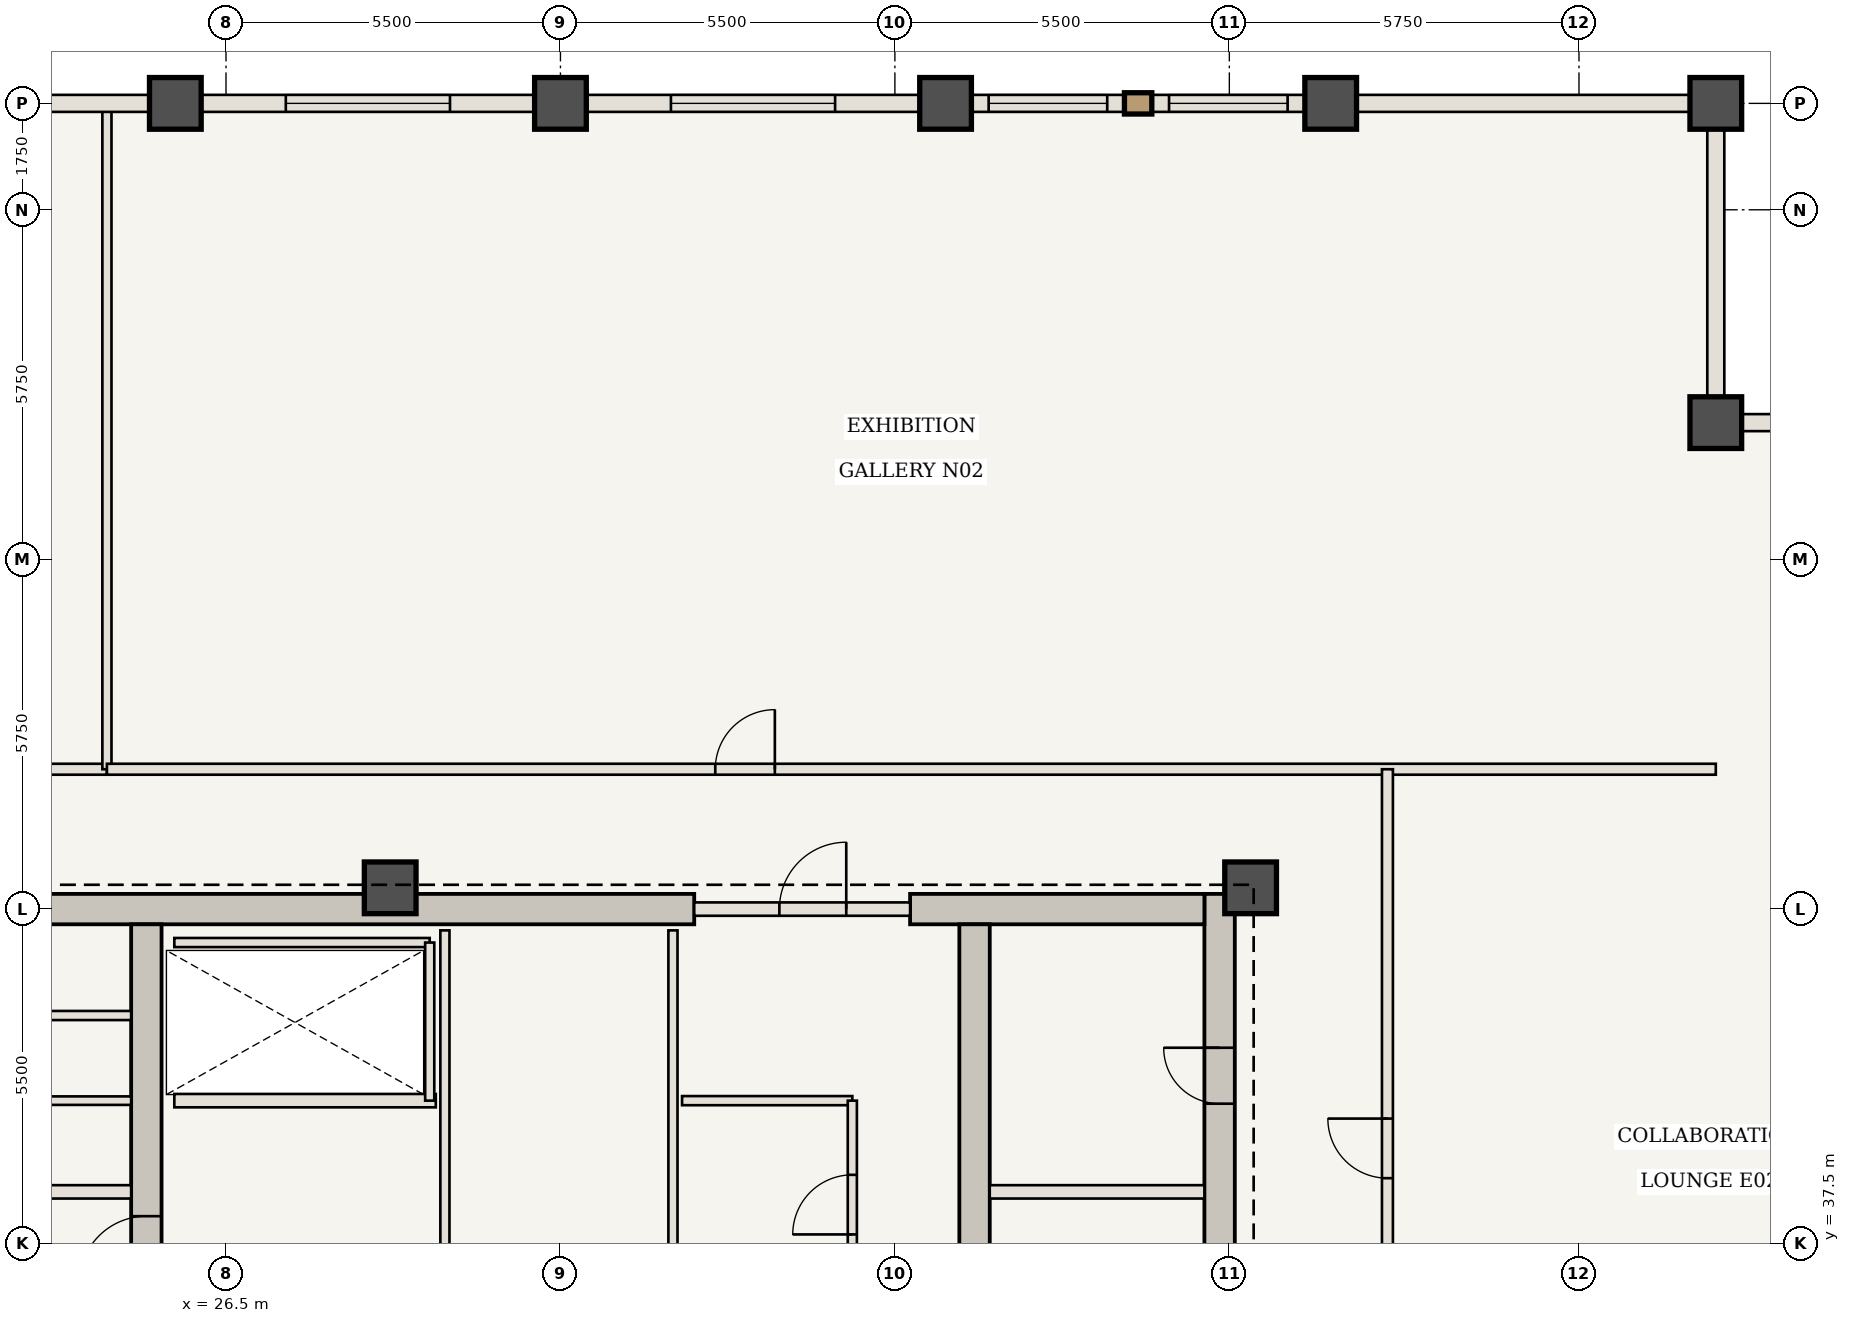
"""IFC4 building model, lengths in metres.
Left out: names, types, materials, properties, quantities, classifications, styles, units other than length and angle.
Written with IfcOpenShell. Run it as: python <this file> out.ifc"""

import sys

from ifc_helpers import new_model, si_unit, direction, frame, frame_2d, origin, origin_2d, place, context, subcontext, project, spatial, rectangle, extrude, element, fill, save


model = new_model("IFC4")
c1 = context("Model", 3, precision=1e-05, world=origin(), true_north=direction((0.0, 1.0)))
c2 = subcontext(c1, "Body", "Model", "MODEL_VIEW")
j1 = project(units=[si_unit("LENGTHUNIT", "METRE"), si_unit("PLANEANGLEUNIT", "RADIAN")], contexts=[c1])
p1 = place(None, origin())
s1 = spatial("IfcSite", under=j1, at=p1, CompositionType="ELEMENT")
p2 = place(p1, origin())
s2 = spatial("IfcBuilding", under=s1, at=p2, CompositionType="ELEMENT")
p3 = place(p2, frame((0.0, 0.0, 217.7)))
s3 = spatial("IfcBuildingStorey", under=s2, at=p3, CompositionType="ELEMENT", Elevation=217.7)
p4 = place(p3, frame((42.84, 30.6, 0.0), z_axis=(0.0, 0.0, 1.0), x_axis=(0.0, 1.0, 0.0)))
e1 = element("IfcWall", 1, at=p4, inside=s3, PredefinedType="SHEAR", context=c2, shape_type="SweptSolid", body=[
    extrude(rectangle(XDim=12.65, YDim=0.5, at=frame_2d((6.325, 0.0))), origin(), (0.0, 0.0, 1.0), 3.85),
])
p5 = place(p4, frame((4.2, 0.0, 0.0)))
e2 = element("IfcOpeningElement", 2, at=p5, cuts=e1, PredefinedType="OPENING", context=c2, shape_type="SweptSolid", body=[
    extrude(rectangle(XDim=1.1, YDim=2.15, at=frame_2d((0.55, 1.075))), frame((0.0, 0.26, 0.0), z_axis=(0.0, -1.0, 0.0), x_axis=(1.0, 0.0, 0.0)), (0.0, 0.0, 1.0), 0.52),
])
p6 = place(p4, frame((9.2, 0.0, 0.0)))
e3 = element("IfcOpeningElement", 3, at=p6, cuts=e1, PredefinedType="OPENING", context=c2, shape_type="SweptSolid", body=[
    extrude(rectangle(XDim=0.92, YDim=2.1, at=frame_2d((0.46, 1.05))), frame((0.0, 0.26, 0.0), z_axis=(0.0, -1.0, 0.0), x_axis=(1.0, 0.0, 0.0)), (0.0, 0.0, 1.0), 0.52),
])
p7 = place(p3, frame((21.41, 43.0, 0.0), z_axis=(0.0, 0.0, 1.0), x_axis=(1.0, 0.0, 0.0)))
e4 = element("IfcWall", 4, at=p7, inside=s3, PredefinedType="SHEAR", context=c2, shape_type="SweptSolid", body=[
    extrude(rectangle(XDim=12.79, YDim=0.5, at=frame_2d((6.395, 0.0))), origin(), (0.0, 0.0, 1.0), 3.85),
])
p8 = place(p3, frame((37.75, 43.0, 0.0), z_axis=(0.0, 0.0, 1.0), x_axis=(1.0, 0.0, 0.0)))
e5 = element("IfcWall", 5, at=p8, inside=s3, PredefinedType="SHEAR", context=c2, shape_type="SweptSolid", body=[
    extrude(rectangle(XDim=4.84, YDim=0.5, at=frame_2d((2.42, 0.0))), origin(), (0.0, 0.0, 1.0), 3.85),
])
p9 = place(p3, frame((25.19, 30.6, 0.0), z_axis=(0.0, 0.0, 1.0), x_axis=(0.0, 1.0, 0.0)))
e6 = element("IfcWall", 6, at=p9, inside=s3, PredefinedType="SHEAR", context=c2, shape_type="SweptSolid", body=[
    extrude(rectangle(XDim=12.15, YDim=0.5, at=frame_2d((6.075, 0.0))), origin(), (0.0, 0.0, 1.0), 3.85),
])
p10 = place(p9, frame((6.25, 0.0, 0.0)))
e7 = element("IfcOpeningElement", 7, at=p10, cuts=e6, PredefinedType="OPENING", context=c2, shape_type="SweptSolid", body=[
    extrude(rectangle(XDim=1.1, YDim=2.15, at=frame_2d((0.55, 1.075))), frame((0.0, 0.26, 0.0), z_axis=(0.0, -1.0, 0.0), x_axis=(1.0, 0.0, 0.0)), (0.0, 0.0, 1.0), 0.52),
])
p11 = place(p3, frame((38.81, 30.6, 0.0), z_axis=(0.0, 0.0, 1.0), x_axis=(0.0, 1.0, 0.0)))
e8 = element("IfcWall", 8, at=p11, inside=s3, PredefinedType="SHEAR", context=c2, shape_type="SweptSolid", body=[
    extrude(rectangle(XDim=12.15, YDim=0.5, at=frame_2d((6.075, 0.0))), origin(), (0.0, 0.0, 1.0), 3.85),
])
for number, where, z_axis, x_axis in (
    (9, (43.35, 43.35, 0.0), (0.0, 0.0, 1.0), (1.0, 0.0, 0.0)),
    (10, (29.2, 43.35, 0.0), (0.0, 0.0, 1.0), (1.0, 0.0, 0.0)),
    (11, (51.0, 51.0, 0.0), (0.0, 0.0, 1.0), (1.0, 0.0, 0.0)),
    (12, (51.0, 56.25, 0.0), (0.0, 0.0, 1.0), (1.0, 0.0, 0.0)),
    (13, (25.667, 56.25, 0.0), (0.0, 0.0, 1.0), (1.0, 0.0, 0.0)),
    (14, (32.0, 56.25, 0.0), (0.0, 0.0, 1.0), (1.0, 0.0, 0.0)),
    (15, (38.333, 56.25, 0.0), (0.0, 0.0, 1.0), (1.0, 0.0, 0.0)),
    (16, (44.667, 56.25, 0.0), (0.0, 0.0, 1.0), (1.0, 0.0, 0.0)),
):
    element("IfcColumn", number, at=place(p3, frame(where, z_axis=z_axis, x_axis=x_axis)), inside=s3, PredefinedType="COLUMN", context=c2, shape_type="SweptSolid", body=[
        extrude(rectangle(XDim=0.85, YDim=0.85, at=origin_2d()), origin(), (0.0, 0.0, 1.0), 3.85),
    ])
for number, where, z_axis, x_axis in (
    (17, (21.41, 38.35, 0.0), (0.0, 0.0, 1.0), (1.0, 0.0, 0.0)),
    (18, (39.06, 38.35, 0.0), (0.0, 0.0, 1.0), (1.0, 0.0, 0.0)),
):
    element("IfcWall", number, at=place(p3, frame(where, z_axis=z_axis, x_axis=x_axis)), inside=s3, PredefinedType="STANDARD", context=c2, shape_type="SweptSolid", body=[
        extrude(rectangle(XDim=3.53, YDim=0.22, at=frame_2d((1.765, 0.0))), origin(), (0.0, 0.0, 1.0), 3.685),
    ])
p12 = place(p3, frame((21.41, 39.85, 0.0), z_axis=(0.0, 0.0, 1.0), x_axis=(1.0, 0.0, 0.0)))
e19 = element("IfcWall", 19, at=p12, inside=s3, PredefinedType="STANDARD", context=c2, shape_type="SweptSolid", body=[
    extrude(rectangle(XDim=3.53, YDim=0.14, at=frame_2d((1.765, 0.0))), origin(), (0.0, 0.0, 1.0), 3.685),
])
p13 = place(p3, frame((21.41, 41.25, 0.0), z_axis=(0.0, 0.0, 1.0), x_axis=(1.0, 0.0, 0.0)))
e20 = element("IfcWall", 20, at=p13, inside=s3, PredefinedType="STANDARD", context=c2, shape_type="SweptSolid", body=[
    extrude(rectangle(XDim=3.53, YDim=0.15, at=frame_2d((1.765, 0.0))), origin(), (0.0, 0.0, 1.0), 3.685),
])
p14 = place(p3, frame((34.0, 39.85, 0.0), z_axis=(0.0, 0.0, 1.0), x_axis=(1.0, 0.0, 0.0)))
e21 = element("IfcWall", 21, at=p14, inside=s3, PredefinedType="STANDARD", context=c2, shape_type="SweptSolid", body=[
    extrude(rectangle(XDim=2.8, YDim=0.15, at=frame_2d((1.4, 0.0))), origin(), (0.0, 0.0, 1.0), 3.685),
])
p15 = place(p3, frame((36.8, 36.95, 0.0), z_axis=(0.0, 0.0, 1.0), x_axis=(0.0, 1.0, 0.0)))
e22 = element("IfcWall", 22, at=p15, inside=s3, PredefinedType="STANDARD", context=c2, shape_type="SweptSolid", body=[
    extrude(rectangle(XDim=2.9, YDim=0.15, at=frame_2d((1.45, 0.0))), origin(), (0.0, 0.0, 1.0), 3.685),
])
p16 = place(p15, frame((0.7, 0.0, 0.0)))
e23 = element("IfcOpeningElement", 23, at=p16, cuts=e22, PredefinedType="OPENING", context=c2, shape_type="SweptSolid", body=[
    extrude(rectangle(XDim=0.98, YDim=2.2, at=frame_2d((0.49, 1.1))), frame((0.0, 0.085, 0.0), z_axis=(0.0, -1.0, 0.0), x_axis=(1.0, 0.0, 0.0)), (0.0, 0.0, 1.0), 0.17),
])
p17 = place(p3, frame((25.65, 39.85, 0.0), z_axis=(0.0, 0.0, 1.0), x_axis=(1.0, 0.0, 0.0)))
e24 = element("IfcWall", 24, at=p17, inside=s3, PredefinedType="STANDARD", context=c2, shape_type="SweptSolid", body=[
    extrude(rectangle(XDim=4.3, YDim=0.22, at=frame_2d((2.15, 0.0))), origin(), (0.0, 0.0, 1.0), 3.685),
])
p18 = place(p3, frame((25.65, 42.45, 0.0), z_axis=(0.0, 0.0, 1.0), x_axis=(1.0, 0.0, 0.0)))
e25 = element("IfcWall", 25, at=p18, inside=s3, PredefinedType="STANDARD", context=c2, shape_type="SweptSolid", body=[
    extrude(rectangle(XDim=4.2, YDim=0.15, at=frame_2d((2.1, 0.0))), origin(), (0.0, 0.0, 1.0), 3.685),
])
p19 = place(p3, frame((29.85, 39.85, 0.0), z_axis=(0.0, 0.0, 1.0), x_axis=(0.0, 1.0, 0.0)))
e26 = element("IfcWall", 26, at=p19, inside=s3, PredefinedType="STANDARD", context=c2, shape_type="SweptSolid", body=[
    extrude(rectangle(XDim=2.6, YDim=0.15, at=frame_2d((1.3, 0.0))), origin(), (0.0, 0.0, 1.0), 3.685),
])
for number, where, z_axis, x_axis in (
    (27, (30.1, 33.45, 0.0), (0.0, 0.0, 1.0), (0.0, 1.0, 0.0)),
    (28, (33.85, 33.45, 0.0), (0.0, 0.0, 1.0), (0.0, 1.0, 0.0)),
):
    element("IfcWall", number, at=place(p3, frame(where, z_axis=z_axis, x_axis=x_axis)), inside=s3, PredefinedType="STANDARD", context=c2, shape_type="SweptSolid", body=[
        extrude(rectangle(XDim=9.2, YDim=0.15, at=frame_2d((4.6, 0.0))), origin(), (0.0, 0.0, 1.0), 3.685),
    ])
p20 = place(p3, frame((34.2, 43.0, 0.0), z_axis=(0.0, 0.0, 1.0), x_axis=(1.0, 0.0, 0.0)))
e29 = element("IfcWall", 29, at=p20, inside=s3, PredefinedType="STANDARD", context=c2, shape_type="SweptSolid", body=[
    extrude(rectangle(XDim=3.55, YDim=0.22, at=frame_2d((1.775, 0.0))), origin(), (0.0, 0.0, 1.0), 3.685),
])
p21 = place(p20, frame((1.4, 0.0, 0.0)))
e30 = element("IfcOpeningElement", 30, at=p21, cuts=e29, PredefinedType="OPENING", context=c2, shape_type="SweptSolid", body=[
    extrude(rectangle(XDim=1.1, YDim=2.15, at=frame_2d((0.55, 1.075))), frame((0.0, 0.12, 0.0), z_axis=(0.0, -1.0, 0.0), x_axis=(1.0, 0.0, 0.0)), (0.0, 0.0, 1.0), 0.24),
])
p22 = place(p3, frame((13.0, 45.3, 0.0), z_axis=(0.0, 0.0, 1.0), x_axis=(1.0, 0.0, 0.0)))
e31 = element("IfcWall", 31, at=p22, inside=s3, PredefinedType="STANDARD", context=c2, shape_type="SweptSolid", body=[
    extrude(rectangle(XDim=11.542, YDim=0.18, at=frame_2d((5.771, 0.0))), origin(), (0.0, 0.0, 1.0), 3.685),
])
p23 = place(p22, frame((6.671, 0.0, 0.0)))
e32 = element("IfcOpeningElement", 32, at=p23, cuts=e31, PredefinedType="OPENING", context=c2, shape_type="SweptSolid", body=[
    extrude(rectangle(XDim=0.98, YDim=2.2, at=frame_2d((0.49, 1.1))), frame((0.0, 0.1, 0.0), z_axis=(0.0, -1.0, 0.0), x_axis=(1.0, 0.0, 0.0)), (0.0, 0.0, 1.0), 0.2),
])
p24 = place(p3, frame((24.542, 45.3, 0.0), z_axis=(0.0, 0.0, 1.0), x_axis=(0.0, 1.0, 0.0)))
e33 = element("IfcWall", 33, at=p24, inside=s3, PredefinedType="STANDARD", context=c2, shape_type="SweptSolid", body=[
    extrude(rectangle(XDim=10.89, YDim=0.15, at=frame_2d((5.445, 0.0))), origin(), (0.0, 0.0, 1.0), 3.685),
])
p25 = place(p3, frame((24.542, 45.3, 0.0), z_axis=(0.0, 0.0, 1.0), x_axis=(1.0, 0.0, 0.0)))
e34 = element("IfcWall", 34, at=p25, inside=s3, PredefinedType="STANDARD", context=c2, shape_type="SweptSolid", body=[
    extrude(rectangle(XDim=26.458, YDim=0.18, at=frame_2d((13.229, 0.0))), origin(), (0.0, 0.0, 1.0), 3.685),
])
p26 = place(p25, frame((10.004, 0.0, 0.0)))
e35 = element("IfcOpeningElement", 35, at=p26, cuts=e34, PredefinedType="OPENING", context=c2, shape_type="SweptSolid", body=[
    extrude(rectangle(XDim=0.98, YDim=2.2, at=frame_2d((0.49, 1.1))), frame((0.0, 0.1, 0.0), z_axis=(0.0, -1.0, 0.0), x_axis=(1.0, 0.0, 0.0)), (0.0, 0.0, 1.0), 0.2),
])
p27 = place(p3, frame((45.6, 32.85, 0.0), z_axis=(0.0, 0.0, 1.0), x_axis=(0.0, 1.0, 0.0)))
e36 = element("IfcWall", 36, at=p27, inside=s3, PredefinedType="STANDARD", context=c2, shape_type="SweptSolid", body=[
    extrude(rectangle(XDim=12.45, YDim=0.18, at=frame_2d((6.225, 0.0))), origin(), (0.0, 0.0, 1.0), 3.685),
])
p28 = place(p27, frame((5.725, 0.0, 0.0)))
e37 = element("IfcOpeningElement", 37, at=p28, cuts=e36, PredefinedType="OPENING", context=c2, shape_type="SweptSolid", body=[
    extrude(rectangle(XDim=0.98, YDim=2.2, at=frame_2d((0.49, 1.1))), frame((0.0, 0.1, 0.0), z_axis=(0.0, -1.0, 0.0), x_axis=(1.0, 0.0, 0.0)), (0.0, 0.0, 1.0), 0.2),
])
p29 = place(p3, frame((19.333, 56.25, 0.0), z_axis=(0.0, 0.0, 1.0), x_axis=(1.0, 0.0, 0.0)))
e38 = element("IfcWall", 38, at=p29, inside=s3, PredefinedType="USERDEFINED", context=c2, shape_type="SweptSolid", body=[
    extrude(rectangle(XDim=6.333, YDim=0.28, at=frame_2d((3.167, 0.0))), origin(), (0.0, 0.0, 1.0), 2.985),
])
p30 = place(p29, frame((0.708, 0.0, 0.85)))
e39 = element("IfcOpeningElement", 39, at=p30, cuts=e38, PredefinedType="OPENING", context=c2, shape_type="SweptSolid", body=[
    extrude(rectangle(XDim=1.95, YDim=1.935, at=frame_2d((0.975, 0.968))), frame((0.0, 0.15, 0.0), z_axis=(0.0, -1.0, 0.0), x_axis=(1.0, 0.0, 0.0)), (0.0, 0.0, 1.0), 0.3),
])
p31 = place(p3, frame((25.667, 56.25, 0.0), z_axis=(0.0, 0.0, 1.0), x_axis=(1.0, 0.0, 0.0)))
e40 = element("IfcWall", 40, at=p31, inside=s3, PredefinedType="USERDEFINED", context=c2, shape_type="SweptSolid", body=[
    extrude(rectangle(XDim=6.333, YDim=0.28, at=frame_2d((3.167, 0.0))), origin(), (0.0, 0.0, 1.0), 2.985),
])
p32 = place(p31, frame((1.817, 0.0, 0.85)))
e41 = element("IfcOpeningElement", 41, at=p32, cuts=e40, PredefinedType="OPENING", context=c2, shape_type="SweptSolid", body=[
    extrude(rectangle(XDim=2.7, YDim=1.935, at=frame_2d((1.35, 0.968))), frame((0.0, 0.15, 0.0), z_axis=(0.0, -1.0, 0.0), x_axis=(1.0, 0.0, 0.0)), (0.0, 0.0, 1.0), 0.3),
])
p33 = place(p3, frame((32.0, 56.25, 0.0), z_axis=(0.0, 0.0, 1.0), x_axis=(1.0, 0.0, 0.0)))
e42 = element("IfcWall", 42, at=p33, inside=s3, PredefinedType="USERDEFINED", context=c2, shape_type="SweptSolid", body=[
    extrude(rectangle(XDim=6.333, YDim=0.28, at=frame_2d((3.167, 0.0))), origin(), (0.0, 0.0, 1.0), 2.985),
])
p34 = place(p33, frame((1.817, 0.0, 0.85)))
e43 = element("IfcOpeningElement", 43, at=p34, cuts=e42, PredefinedType="OPENING", context=c2, shape_type="SweptSolid", body=[
    extrude(rectangle(XDim=2.7, YDim=1.935, at=frame_2d((1.35, 0.968))), frame((0.0, 0.15, 0.0), z_axis=(0.0, -1.0, 0.0), x_axis=(1.0, 0.0, 0.0)), (0.0, 0.0, 1.0), 0.3),
])
p35 = place(p3, frame((38.333, 56.25, 0.0), z_axis=(0.0, 0.0, 1.0), x_axis=(1.0, 0.0, 0.0)))
e44 = element("IfcWall", 44, at=p35, inside=s3, PredefinedType="USERDEFINED", context=c2, shape_type="SweptSolid", body=[
    extrude(rectangle(XDim=6.333, YDim=0.28, at=frame_2d((3.167, 0.0))), origin(), (0.0, 0.0, 1.0), 2.985),
])
p36 = place(p35, frame((0.708, 0.0, 0.85)))
e45 = element("IfcOpeningElement", 45, at=p36, cuts=e44, PredefinedType="OPENING", context=c2, shape_type="SweptSolid", body=[
    extrude(rectangle(XDim=1.95, YDim=1.935, at=frame_2d((0.975, 0.968))), frame((0.0, 0.15, 0.0), z_axis=(0.0, -1.0, 0.0), x_axis=(1.0, 0.0, 0.0)), (0.0, 0.0, 1.0), 0.3),
])
p37 = place(p35, frame((3.675, 0.0, 0.85)))
e46 = element("IfcOpeningElement", 46, at=p37, cuts=e44, PredefinedType="OPENING", context=c2, shape_type="SweptSolid", body=[
    extrude(rectangle(XDim=1.95, YDim=1.935, at=frame_2d((0.975, 0.968))), frame((0.0, 0.15, 0.0), z_axis=(0.0, -1.0, 0.0), x_axis=(1.0, 0.0, 0.0)), (0.0, 0.0, 1.0), 0.3),
])
p38 = place(p3, frame((44.667, 56.25, 0.0), z_axis=(0.0, 0.0, 1.0), x_axis=(1.0, 0.0, 0.0)))
e47 = element("IfcWall", 47, at=p38, inside=s3, PredefinedType="USERDEFINED", context=c2, shape_type="SweptSolid", body=[
    extrude(rectangle(XDim=6.333, YDim=0.28, at=frame_2d((3.167, 0.0))), origin(), (0.0, 0.0, 1.0), 2.985),
])
for number, where, z_axis, x_axis in (
    (48, (51.0, 51.0, 0.0), (0.0, 0.0, 1.0), (1.0, 0.0, 0.0)),
    (49, (51.0, 56.25, 0.0), (0.0, 0.0, 1.0), (0.0, -1.0, 0.0)),
):
    element("IfcWall", number, at=place(p3, frame(where, z_axis=z_axis, x_axis=x_axis)), inside=s3, PredefinedType="USERDEFINED", context=c2, shape_type="SweptSolid", body=[
        extrude(rectangle(XDim=5.25, YDim=0.28, at=frame_2d((2.625, 0.0))), origin(), (0.0, 0.0, 1.0), 2.985),
    ])
p39 = place(p10, origin())
e50 = element("IfcDoor", 50, at=p39, inside=s3, OperationType="SINGLE_SWING_LEFT", PredefinedType="DOOR", context=c2, shape_type="SweptSolid", body=[
    extrude(rectangle(XDim=1.1, YDim=2.15, at=frame_2d((0.55, 1.075))), frame((0.0, 0.025, 0.0), z_axis=(0.0, -1.0, 0.0), x_axis=(1.0, 0.0, 0.0)), (0.0, 0.0, 1.0), 0.05),
])
fill(e7, e50)
p40 = place(p6, origin())
e51 = element("IfcDoor", 51, at=p40, inside=s3, OperationType="SINGLE_SWING_RIGHT", PredefinedType="DOOR", context=c2, shape_type="SweptSolid", body=[
    extrude(rectangle(XDim=0.92, YDim=2.1, at=frame_2d((0.46, 1.05))), frame((0.0, 0.025, 0.0), z_axis=(0.0, -1.0, 0.0), x_axis=(1.0, 0.0, 0.0)), (0.0, 0.0, 1.0), 0.05),
])
fill(e3, e51)
p41 = place(p16, origin())
e52 = element("IfcDoor", 52, at=p41, inside=s3, OperationType="SINGLE_SWING_LEFT", PredefinedType="DOOR", context=c2, shape_type="SweptSolid", body=[
    extrude(rectangle(XDim=0.98, YDim=2.2, at=frame_2d((0.49, 1.1))), frame((0.0, 0.025, 0.0), z_axis=(0.0, -1.0, 0.0), x_axis=(1.0, 0.0, 0.0)), (0.0, 0.0, 1.0), 0.05),
])
fill(e23, e52)
p42 = place(p21, origin())
e53 = element("IfcDoor", 53, at=p42, inside=s3, OperationType="SINGLE_SWING_RIGHT", PredefinedType="DOOR", context=c2, shape_type="SweptSolid", body=[
    extrude(rectangle(XDim=1.1, YDim=2.15, at=frame_2d((0.55, 1.075))), frame((0.0, 0.025, 0.0), z_axis=(0.0, -1.0, 0.0), x_axis=(1.0, 0.0, 0.0)), (0.0, 0.0, 1.0), 0.05),
])
fill(e30, e53)
p43 = place(p26, origin())
e54 = element("IfcDoor", 54, at=p43, inside=s3, OperationType="SINGLE_SWING_RIGHT", PredefinedType="DOOR", context=c2, shape_type="SweptSolid", body=[
    extrude(rectangle(XDim=0.98, YDim=2.2, at=frame_2d((0.49, 1.1))), frame((0.0, 0.025, 0.0), z_axis=(0.0, -1.0, 0.0), x_axis=(1.0, 0.0, 0.0)), (0.0, 0.0, 1.0), 0.05),
])
fill(e35, e54)
p44 = place(p28, origin())
e55 = element("IfcDoor", 55, at=p44, inside=s3, OperationType="SINGLE_SWING_RIGHT", PredefinedType="DOOR", context=c2, shape_type="SweptSolid", body=[
    extrude(rectangle(XDim=0.98, YDim=2.2, at=frame_2d((0.49, 1.1))), frame((0.0, 0.025, 0.0), z_axis=(0.0, -1.0, 0.0), x_axis=(1.0, 0.0, 0.0)), (0.0, 0.0, 1.0), 0.05),
])
fill(e37, e55)
p45 = place(p32, origin())
e56 = element("IfcWindow", 56, at=p45, inside=s3, PartitioningType="SINGLE_PANEL", PredefinedType="WINDOW", context=c2, shape_type="SweptSolid", body=[
    extrude(rectangle(XDim=2.7, YDim=1.935, at=frame_2d((1.35, 0.968))), frame((0.0, 0.03, 0.0), z_axis=(0.0, -1.0, 0.0), x_axis=(1.0, 0.0, 0.0)), (0.0, 0.0, 1.0), 0.06),
])
fill(e41, e56)
p46 = place(p34, origin())
e57 = element("IfcWindow", 57, at=p46, inside=s3, PartitioningType="SINGLE_PANEL", PredefinedType="WINDOW", context=c2, shape_type="SweptSolid", body=[
    extrude(rectangle(XDim=2.7, YDim=1.935, at=frame_2d((1.35, 0.968))), frame((0.0, 0.03, 0.0), z_axis=(0.0, -1.0, 0.0), x_axis=(1.0, 0.0, 0.0)), (0.0, 0.0, 1.0), 0.06),
])
fill(e43, e57)
p47 = place(p36, origin())
e58 = element("IfcWindow", 58, at=p47, inside=s3, PartitioningType="SINGLE_PANEL", PredefinedType="WINDOW", context=c2, shape_type="SweptSolid", body=[
    extrude(rectangle(XDim=1.95, YDim=1.935, at=frame_2d((0.975, 0.968))), frame((0.0, 0.03, 0.0), z_axis=(0.0, -1.0, 0.0), x_axis=(1.0, 0.0, 0.0)), (0.0, 0.0, 1.0), 0.06),
])
fill(e45, e58)
p48 = place(p37, origin())
e59 = element("IfcWindow", 59, at=p48, inside=s3, PartitioningType="SINGLE_PANEL", PredefinedType="WINDOW", context=c2, shape_type="SweptSolid", body=[
    extrude(rectangle(XDim=1.95, YDim=1.935, at=frame_2d((0.975, 0.968))), frame((0.0, 0.03, 0.0), z_axis=(0.0, -1.0, 0.0), x_axis=(1.0, 0.0, 0.0)), (0.0, 0.0, 1.0), 0.06),
])
fill(e46, e59)
save(model, sys.argv[1])
